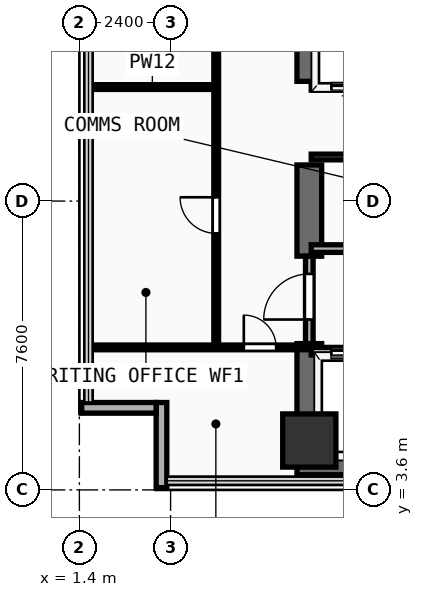
"""IFC4 building model, lengths in metres.
Left out: names, types, materials, properties, quantities, classifications, styles, units other than length and angle.
Written with IfcOpenShell. Run it as: python <this file> out.ifc"""

import sys

from ifc_helpers import new_model, si_unit, direction, frame, frame_2d, origin, origin_2d, place, context, subcontext, project, spatial, rectangle, extrude, element, fill, save


model = new_model("IFC4")
c1 = context("Model", 3, precision=1e-05, world=origin(), true_north=direction((0.0, 1.0)))
c2 = subcontext(c1, "Body", "Model", "MODEL_VIEW")
j1 = project(units=[si_unit("LENGTHUNIT", "METRE"), si_unit("PLANEANGLEUNIT", "RADIAN")], contexts=[c1])
p1 = place(None, origin())
s1 = spatial("IfcSite", under=j1, at=p1, CompositionType="ELEMENT")
p2 = place(p1, origin())
s2 = spatial("IfcBuilding", under=s1, at=p2, CompositionType="ELEMENT")
p3 = place(p2, frame((0.0, 0.0, 129.7)))
s3 = spatial("IfcBuildingStorey", under=s2, at=p3, CompositionType="ELEMENT", Elevation=129.7)
p4 = place(p3, frame((7.125, 4.325, 0.0), z_axis=(0.0, 0.0, 1.0), x_axis=(1.0, 0.0, 0.0)))
e1 = element("IfcWall", 1, at=p4, inside=s3, PredefinedType="SHEAR", context=c2, shape_type="SweptSolid", body=[
    extrude(rectangle(XDim=14.0, YDim=0.65, at=frame_2d((7.0, 0.0))), origin(), (0.0, 0.0, 1.0), 3.54),
])
p5 = place(p3, frame((7.45, 4.65, 0.0), z_axis=(0.0, 0.0, 1.0), x_axis=(0.0, 1.0, 0.0)))
e2 = element("IfcWall", 2, at=p5, inside=s3, PredefinedType="SHEAR", context=c2, shape_type="SweptSolid", body=[
    extrude(rectangle(XDim=2.8, YDim=0.65, at=frame_2d((1.4, 0.0))), origin(), (0.0, 0.0, 1.0), 3.54),
])
p6 = place(p3, frame((7.45, 9.75, 0.0), z_axis=(0.0, 0.0, 1.0), x_axis=(0.0, 1.0, 0.0)))
e3 = element("IfcWall", 3, at=p6, inside=s3, PredefinedType="SHEAR", context=c2, shape_type="SweptSolid", body=[
    extrude(rectangle(XDim=2.4, YDim=0.65, at=frame_2d((1.2, 0.0))), origin(), (0.0, 0.0, 1.0), 3.54),
])
p7 = place(p3, frame((7.45, 14.35, 0.0), z_axis=(0.0, 0.0, 1.0), x_axis=(0.0, 1.0, 0.0)))
e4 = element("IfcWall", 4, at=p7, inside=s3, PredefinedType="SHEAR", context=c2, shape_type="SweptSolid", body=[
    extrude(rectangle(XDim=4.81, YDim=0.65, at=frame_2d((2.405, 0.0))), origin(), (0.0, 0.0, 1.0), 3.54),
])
p8 = place(p3, frame((7.45, 4.9, 0.0), z_axis=(0.0, 0.0, 1.0), x_axis=(1.0, 0.0, 0.0)))
e5 = element("IfcColumn", 5, at=p8, inside=s3, PredefinedType="COLUMN", context=c2, shape_type="SweptSolid", body=[
    extrude(rectangle(XDim=1.4, YDim=1.4, at=origin_2d()), origin(), (0.0, 0.0, 1.0), 3.54),
])
p9 = place(p3, frame((3.56, 3.66, 0.0), z_axis=(0.0, 0.0, 1.0), x_axis=(0.0, 1.0, 0.0)))
e6 = element("IfcWall", 6, at=p9, inside=s3, PredefinedType="SOLIDWALL", context=c2, shape_type="SweptSolid", body=[
    extrude(rectangle(XDim=2.24, YDim=0.28, at=frame_2d((1.12, 0.0))), origin(), (0.0, 0.0, 1.0), 3.54),
])
p10 = place(p3, frame((1.46, 5.76, 0.0), z_axis=(0.0, 0.0, 1.0), x_axis=(1.0, 0.0, 0.0)))
e7 = element("IfcWall", 7, at=p10, inside=s3, PredefinedType="SOLIDWALL", context=c2, shape_type="SweptSolid", body=[
    extrude(rectangle(XDim=1.96, YDim=0.28, at=frame_2d((0.98, 0.0))), origin(), (0.0, 0.0, 1.0), 3.54),
])
p11 = place(p3, frame((7.5, 7.25, 0.0), z_axis=(0.0, 0.0, 1.0), x_axis=(1.0, 0.0, 0.0)))
e8 = element("IfcWall", 8, at=p11, inside=s3, PredefinedType="PARTITIONING", context=c2, shape_type="SweptSolid", body=[
    extrude(rectangle(XDim=8.35, YDim=0.2, at=frame_2d((4.175, 0.0))), origin(), (0.0, 0.0, 1.0), 3.54),
])
p12 = place(p11, frame((0.53, 0.0, 0.0)))
e9 = element("IfcOpeningElement", 9, at=p12, cuts=e8, PredefinedType="OPENING", context=c2, shape_type="SweptSolid", body=[
    extrude(rectangle(XDim=1.1, YDim=2.2, at=frame_2d((0.55, 1.1))), frame((0.0, 0.11, 0.0), z_axis=(0.0, -1.0, 0.0), x_axis=(1.0, 0.0, 0.0)), (0.0, 0.0, 1.0), 0.22),
])
p13 = place(p11, frame((2.37, 0.0, 0.0)))
e10 = element("IfcOpeningElement", 10, at=p13, cuts=e8, PredefinedType="OPENING", context=c2, shape_type="SweptSolid", body=[
    extrude(rectangle(XDim=1.1, YDim=2.2, at=frame_2d((0.55, 1.1))), frame((0.0, 0.11, 0.0), z_axis=(0.0, -1.0, 0.0), x_axis=(1.0, 0.0, 0.0)), (0.0, 0.0, 1.0), 0.22),
])
p14 = place(p11, frame((4.33, 0.0, 0.0)))
e11 = element("IfcOpeningElement", 11, at=p14, cuts=e8, PredefinedType="OPENING", context=c2, shape_type="SweptSolid", body=[
    extrude(rectangle(XDim=1.1, YDim=2.2, at=frame_2d((0.55, 1.1))), frame((0.0, 0.11, 0.0), z_axis=(0.0, -1.0, 0.0), x_axis=(1.0, 0.0, 0.0)), (0.0, 0.0, 1.0), 0.22),
])
p15 = place(p11, frame((6.5, 0.0, 0.0)))
e12 = element("IfcOpeningElement", 12, at=p15, cuts=e8, PredefinedType="OPENING", context=c2, shape_type="SweptSolid", body=[
    extrude(rectangle(XDim=1.1, YDim=2.2, at=frame_2d((0.55, 1.1))), frame((0.0, 0.11, 0.0), z_axis=(0.0, -1.0, 0.0), x_axis=(1.0, 0.0, 0.0)), (0.0, 0.0, 1.0), 0.22),
])
p16 = place(p3, frame((7.5, 9.95, 0.0), z_axis=(0.0, 0.0, 1.0), x_axis=(1.0, 0.0, 0.0)))
e13 = element("IfcWall", 13, at=p16, inside=s3, PredefinedType="PARTITIONING", context=c2, shape_type="SweptSolid", body=[
    extrude(rectangle(XDim=8.35, YDim=0.2, at=frame_2d((4.175, 0.0))), origin(), (0.0, 0.0, 1.0), 3.54),
])
p17 = place(p3, frame((7.45, 7.45, 0.0), z_axis=(0.0, 0.0, 1.0), x_axis=(0.0, 1.0, 0.0)))
e14 = element("IfcWall", 14, at=p17, inside=s3, PredefinedType="PARTITIONING", context=c2, shape_type="SweptSolid", body=[
    extrude(rectangle(XDim=2.3, YDim=0.2, at=frame_2d((1.15, 0.0))), origin(), (0.0, 0.0, 1.0), 2.52),
])
p18 = place(p17, frame((0.633, 0.0, 0.0)))
e15 = element("IfcOpeningElement", 15, at=p18, cuts=e14, PredefinedType="OPENING", context=c2, shape_type="SweptSolid", body=[
    extrude(rectangle(XDim=1.2, YDim=2.25, at=frame_2d((0.6, 1.125))), frame((0.0, 0.11, 0.0), z_axis=(0.0, -1.0, 0.0), x_axis=(1.0, 0.0, 0.0)), (0.0, 0.0, 1.0), 0.22),
])
p19 = place(p3, frame((7.5, 12.36, 0.0), z_axis=(0.0, 0.0, 1.0), x_axis=(1.0, 0.0, 0.0)))
e16 = element("IfcWall", 16, at=p19, inside=s3, PredefinedType="PARTITIONING", context=c2, shape_type="SweptSolid", body=[
    extrude(rectangle(XDim=7.85, YDim=0.15, at=frame_2d((3.925, 0.0))), origin(), (0.0, 0.0, 1.0), 3.54),
])
p20 = place(p19, frame((2.202, 0.0, 0.0)))
e17 = element("IfcOpeningElement", 17, at=p20, cuts=e16, PredefinedType="OPENING", context=c2, shape_type="SweptSolid", body=[
    extrude(rectangle(XDim=0.85, YDim=2.15, at=frame_2d((0.425, 1.075))), frame((0.0, 0.085, 0.0), z_axis=(0.0, -1.0, 0.0), x_axis=(1.0, 0.0, 0.0)), (0.0, 0.0, 1.0), 0.17),
])
p21 = place(p19, frame((6.025, 0.0, 0.0)))
e18 = element("IfcOpeningElement", 18, at=p21, cuts=e16, PredefinedType="OPENING", context=c2, shape_type="SweptSolid", body=[
    extrude(rectangle(XDim=0.85, YDim=2.15, at=frame_2d((0.425, 1.075))), frame((0.0, 0.085, 0.0), z_axis=(0.0, -1.0, 0.0), x_axis=(1.0, 0.0, 0.0)), (0.0, 0.0, 1.0), 0.17),
])
p22 = place(p3, frame((7.5, 14.22, 0.0), z_axis=(0.0, 0.0, 1.0), x_axis=(1.0, 0.0, 0.0)))
e19 = element("IfcWall", 19, at=p22, inside=s3, PredefinedType="PARTITIONING", context=c2, shape_type="SweptSolid", body=[
    extrude(rectangle(XDim=7.85, YDim=0.2, at=frame_2d((3.925, 0.0))), origin(), (0.0, 0.0, 1.0), 3.54),
])
p23 = place(p22, frame((0.53, 0.0, 0.0)))
e20 = element("IfcOpeningElement", 20, at=p23, cuts=e19, PredefinedType="OPENING", context=c2, shape_type="SweptSolid", body=[
    extrude(rectangle(XDim=1.1, YDim=2.2, at=frame_2d((0.55, 1.1))), frame((0.0, 0.11, 0.0), z_axis=(0.0, -1.0, 0.0), x_axis=(1.0, 0.0, 0.0)), (0.0, 0.0, 1.0), 0.22),
])
p24 = place(p22, frame((2.42, 0.0, 0.0)))
e21 = element("IfcOpeningElement", 21, at=p24, cuts=e19, PredefinedType="OPENING", context=c2, shape_type="SweptSolid", body=[
    extrude(rectangle(XDim=1.1, YDim=2.2, at=frame_2d((0.55, 1.1))), frame((0.0, 0.11, 0.0), z_axis=(0.0, -1.0, 0.0), x_axis=(1.0, 0.0, 0.0)), (0.0, 0.0, 1.0), 0.22),
])
p25 = place(p22, frame((4.31, 0.0, 0.0)))
e22 = element("IfcOpeningElement", 22, at=p25, cuts=e19, PredefinedType="OPENING", context=c2, shape_type="SweptSolid", body=[
    extrude(rectangle(XDim=1.1, YDim=2.2, at=frame_2d((0.55, 1.1))), frame((0.0, 0.11, 0.0), z_axis=(0.0, -1.0, 0.0), x_axis=(1.0, 0.0, 0.0)), (0.0, 0.0, 1.0), 0.22),
])
p26 = place(p22, frame((6.2, 0.0, 0.0)))
e23 = element("IfcOpeningElement", 23, at=p26, cuts=e19, PredefinedType="OPENING", context=c2, shape_type="SweptSolid", body=[
    extrude(rectangle(XDim=1.1, YDim=2.2, at=frame_2d((0.55, 1.1))), frame((0.0, 0.11, 0.0), z_axis=(0.0, -1.0, 0.0), x_axis=(1.0, 0.0, 0.0)), (0.0, 0.0, 1.0), 0.22),
])
p27 = place(p3, frame((1.64, 7.35, 0.0), z_axis=(0.0, 0.0, 1.0), x_axis=(1.0, 0.0, 0.0)))
e24 = element("IfcWall", 24, at=p27, inside=s3, PredefinedType="PARTITIONING", context=c2, shape_type="SweptSolid", body=[
    extrude(rectangle(XDim=5.76, YDim=0.125, at=frame_2d((2.88, 0.0))), origin(), (0.0, 0.0, 1.0), 3.54),
])
p28 = place(p27, frame((4.087, 0.0, 0.0)))
e25 = element("IfcOpeningElement", 25, at=p28, cuts=e24, PredefinedType="OPENING", context=c2, shape_type="SweptSolid", body=[
    extrude(rectangle(XDim=0.85, YDim=2.15, at=frame_2d((0.425, 1.075))), frame((0.0, 0.073, 0.0), z_axis=(0.0, -1.0, 0.0), x_axis=(1.0, 0.0, 0.0)), (0.0, 0.0, 1.0), 0.145),
])
p29 = place(p3, frame((5.0, 7.5, 0.0), z_axis=(0.0, 0.0, 1.0), x_axis=(0.0, 1.0, 0.0)))
e26 = element("IfcWall", 26, at=p29, inside=s3, PredefinedType="PARTITIONING", context=c2, shape_type="SweptSolid", body=[
    extrude(rectangle(XDim=17.75, YDim=0.125, at=frame_2d((8.875, 0.0))), origin(), (0.0, 0.0, 1.0), 3.54),
])
p30 = place(p29, frame((2.85, 0.0, 0.0)))
e27 = element("IfcOpeningElement", 27, at=p30, cuts=e26, PredefinedType="OPENING", context=c2, shape_type="SweptSolid", body=[
    extrude(rectangle(XDim=0.95, YDim=2.15, at=frame_2d((0.475, 1.075))), frame((0.0, 0.073, 0.0), z_axis=(0.0, -1.0, 0.0), x_axis=(1.0, 0.0, 0.0)), (0.0, 0.0, 1.0), 0.145),
])
p31 = place(p29, frame((11.821, 0.0, 0.0)))
e28 = element("IfcOpeningElement", 28, at=p31, cuts=e26, PredefinedType="OPENING", context=c2, shape_type="SweptSolid", body=[
    extrude(rectangle(XDim=0.95, YDim=2.15, at=frame_2d((0.475, 1.075))), frame((0.0, 0.073, 0.0), z_axis=(0.0, -1.0, 0.0), x_axis=(1.0, 0.0, 0.0)), (0.0, 0.0, 1.0), 0.145),
])
p32 = place(p3, frame((1.64, 14.2, 0.0), z_axis=(0.0, 0.0, 1.0), x_axis=(1.0, 0.0, 0.0)))
e29 = element("IfcWall", 29, at=p32, inside=s3, PredefinedType="PARTITIONING", context=c2, shape_type="SweptSolid", body=[
    extrude(rectangle(XDim=3.36, YDim=0.125, at=frame_2d((1.68, 0.0))), origin(), (0.0, 0.0, 1.0), 3.54),
])
p33 = place(p12, origin())
e30 = element("IfcDoor", 30, at=p33, inside=s3, OperationType="SLIDING_TO_LEFT", PredefinedType="DOOR", context=c2, shape_type="SweptSolid", body=[
    extrude(rectangle(XDim=1.1, YDim=2.2, at=frame_2d((0.55, 1.1))), frame((0.0, 0.025, 0.0), z_axis=(0.0, -1.0, 0.0), x_axis=(1.0, 0.0, 0.0)), (0.0, 0.0, 1.0), 0.05),
])
fill(e9, e30)
p34 = place(p18, frame((1.2, 0.0, 0.0), z_axis=(0.0, 0.0, 1.0), x_axis=(-1.0, 0.0, 0.0)))
e31 = element("IfcDoor", 31, at=p34, inside=s3, OperationType="SINGLE_SWING_RIGHT", PredefinedType="DOOR", context=c2, shape_type="SweptSolid", body=[
    extrude(rectangle(XDim=1.2, YDim=2.25, at=frame_2d((0.6, 1.125))), frame((0.0, 0.025, 0.0), z_axis=(0.0, -1.0, 0.0), x_axis=(1.0, 0.0, 0.0)), (0.0, 0.0, 1.0), 0.05),
])
fill(e15, e31)
p35 = place(p23, frame((1.1, 0.0, 0.0), z_axis=(0.0, 0.0, 1.0), x_axis=(-1.0, 0.0, 0.0)))
e32 = element("IfcDoor", 32, at=p35, inside=s3, OperationType="SLIDING_TO_LEFT", PredefinedType="DOOR", context=c2, shape_type="SweptSolid", body=[
    extrude(rectangle(XDim=1.1, YDim=2.2, at=frame_2d((0.55, 1.1))), frame((0.0, 0.025, 0.0), z_axis=(0.0, -1.0, 0.0), x_axis=(1.0, 0.0, 0.0)), (0.0, 0.0, 1.0), 0.05),
])
fill(e20, e32)
p36 = place(p28, origin())
e33 = element("IfcDoor", 33, at=p36, inside=s3, OperationType="SINGLE_SWING_LEFT", PredefinedType="DOOR", context=c2, shape_type="SweptSolid", body=[
    extrude(rectangle(XDim=0.85, YDim=2.15, at=frame_2d((0.425, 1.075))), frame((0.0, 0.025, 0.0), z_axis=(0.0, -1.0, 0.0), x_axis=(1.0, 0.0, 0.0)), (0.0, 0.0, 1.0), 0.05),
])
fill(e25, e33)
p37 = place(p30, origin())
e34 = element("IfcDoor", 34, at=p37, inside=s3, OperationType="SINGLE_SWING_RIGHT", PredefinedType="DOOR", context=c2, shape_type="SweptSolid", body=[
    extrude(rectangle(XDim=0.95, YDim=2.15, at=frame_2d((0.475, 1.075))), frame((0.0, 0.025, 0.0), z_axis=(0.0, -1.0, 0.0), x_axis=(1.0, 0.0, 0.0)), (0.0, 0.0, 1.0), 0.05),
])
fill(e27, e34)
save(model, sys.argv[1])
